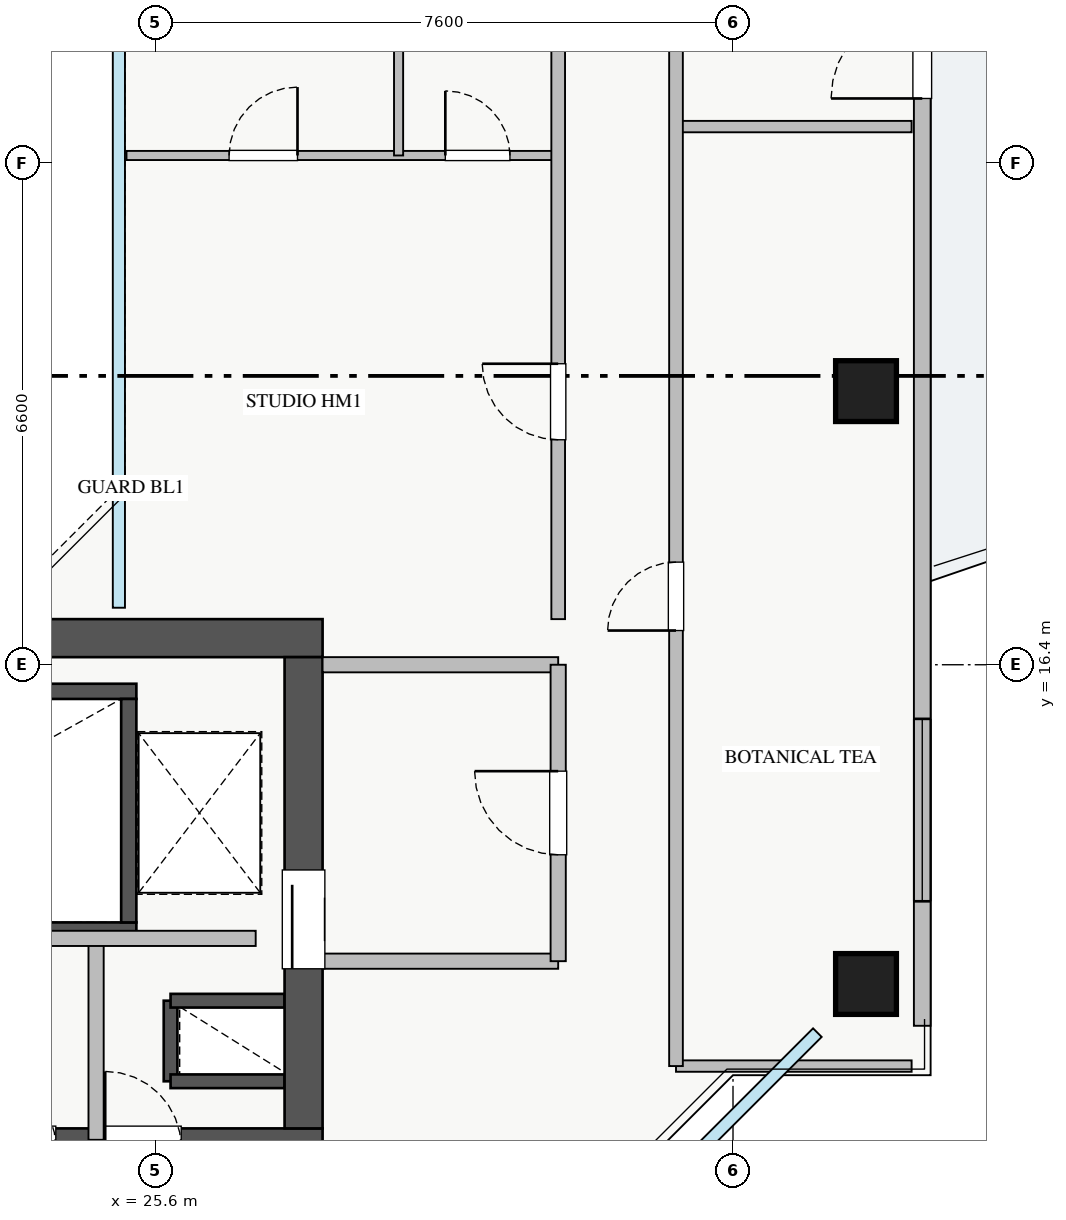
"""IFC4 building model, lengths in metres.
Left out: names, types, materials, properties, quantities, classifications, styles, units other than length and angle.
Written with IfcOpenShell. Run it as: python <this file> out.ifc"""

import sys

from ifc_helpers import new_model, si_unit, direction, frame, frame_2d, origin, origin_2d, place, context, subcontext, project, spatial, rectangle, extrude, source, transform, mapped, element, fill, save


model = new_model("IFC4")
c1 = context("Model", 3, precision=1e-05, world=origin(), true_north=direction((0.0, 1.0)))
c2 = subcontext(c1, "Body", "Model", "MODEL_VIEW")
j1 = project(units=[si_unit("LENGTHUNIT", "METRE"), si_unit("PLANEANGLEUNIT", "RADIAN")], contexts=[c1])
p1 = place(None, origin())
s1 = spatial("IfcSite", under=j1, at=p1, CompositionType="ELEMENT")
p2 = place(p1, origin())
s2 = spatial("IfcBuilding", under=s1, at=p2, CompositionType="ELEMENT")
p3 = place(p2, frame((0.0, 0.0, 190.5)))
s3 = spatial("IfcBuildingStorey", under=s2, at=p3, CompositionType="ELEMENT", Elevation=190.5)
p4 = place(p3, frame((25.8, 10.92, 0.0), z_axis=(0.0, 0.0, 1.0), x_axis=(0.0, 1.0, 0.0)))
e1 = element("IfcWall", 1, at=p4, inside=s3, PredefinedType="SHEAR", context=c2, shape_type="SweptSolid", body=[
    extrude(rectangle(XDim=1.06, YDim=0.18, at=frame_2d((0.53, 0.0))), origin(), (0.0, 0.0, 1.0), 3.07),
])
for number, where, z_axis, x_axis in (
    (2, (25.8, 11.98, 0.0), (0.0, 0.0, 1.0), (1.0, 0.0, 0.0)),
    (3, (25.8, 10.92, 0.0), (0.0, 0.0, 1.0), (1.0, 0.0, 0.0)),
):
    element("IfcWall", number, at=place(p3, frame(where, z_axis=z_axis, x_axis=x_axis)), inside=s3, PredefinedType="SHEAR", context=c2, shape_type="SweptSolid", body=[
        extrude(rectangle(XDim=1.5, YDim=0.18, at=frame_2d((0.75, 0.0))), origin(), (0.0, 0.0, 1.0), 3.07),
    ])
p5 = place(p3, frame((18.2, 12.91, 0.0), z_axis=(0.0, 0.0, 1.0), x_axis=(1.0, 0.0, 0.0)))
e4 = element("IfcWall", 4, at=p5, inside=s3, PredefinedType="SHEAR", context=c2, shape_type="SweptSolid", body=[
    extrude(rectangle(XDim=7.15, YDim=0.2, at=frame_2d((3.575, 0.0))), origin(), (0.0, 0.0, 1.0), 3.25),
])
p6 = place(p5, frame((0.35, 0.0, 0.0)))
e5 = element("IfcOpeningElement", 5, at=p6, cuts=e4, PredefinedType="OPENING", context=c2, shape_type="SweptSolid", body=[
    extrude(rectangle(XDim=1.1, YDim=2.05, at=frame_2d((0.55, 1.025))), frame((0.0, 0.11, 0.0), z_axis=(0.0, -1.0, 0.0), x_axis=(1.0, 0.0, 0.0)), (0.0, 0.0, 1.0), 0.22),
])
p7 = place(p3, frame((18.2, 16.05, 0.0), z_axis=(0.0, 0.0, 1.0), x_axis=(1.0, 0.0, 0.0)))
e6 = element("IfcWall", 6, at=p7, inside=s3, PredefinedType="SHEAR", context=c2, shape_type="SweptSolid", body=[
    extrude(rectangle(XDim=7.15, YDim=0.2, at=frame_2d((3.575, 0.0))), origin(), (0.0, 0.0, 1.0), 3.25),
])
p8 = place(p3, frame((25.25, 13.01, 0.0), z_axis=(0.0, 0.0, 1.0), x_axis=(0.0, 1.0, 0.0)))
e7 = element("IfcWall", 7, at=p8, inside=s3, PredefinedType="SHEAR", context=c2, shape_type="SweptSolid", body=[
    extrude(rectangle(XDim=2.94, YDim=0.2, at=frame_2d((1.47, 0.0))), origin(), (0.0, 0.0, 1.0), 3.25),
])
p9 = place(p3, frame((10.2, 10.05, 0.0), z_axis=(0.0, 0.0, 1.0), x_axis=(1.0, 0.0, 0.0)))
e8 = element("IfcWall", 8, at=p9, inside=s3, PredefinedType="SHEAR", context=c2, shape_type="SweptSolid", body=[
    extrude(rectangle(XDim=17.6, YDim=0.5, at=frame_2d((8.8, 0.0))), origin(), (0.0, 0.0, 1.0), 3.25),
])
p10 = place(p9, frame((1.15, 0.0, 0.0)))
e9 = element("IfcOpeningElement", 9, at=p10, cuts=e8, PredefinedType="OPENING", context=c2, shape_type="SweptSolid", body=[
    extrude(rectangle(XDim=1.1, YDim=2.05, at=frame_2d((0.55, 1.025))), frame((0.0, 0.26, 0.0), z_axis=(0.0, -1.0, 0.0), x_axis=(1.0, 0.0, 0.0)), (0.0, 0.0, 1.0), 0.52),
])
p11 = place(p9, frame((8.3, 0.0, 0.0)))
e10 = element("IfcOpeningElement", 10, at=p11, cuts=e8, PredefinedType="OPENING", context=c2, shape_type="SweptSolid", body=[
    extrude(rectangle(XDim=1.1, YDim=2.05, at=frame_2d((0.55, 1.025))), frame((0.0, 0.26, 0.0), z_axis=(0.0, -1.0, 0.0), x_axis=(1.0, 0.0, 0.0)), (0.0, 0.0, 1.0), 0.52),
])
p12 = place(p9, frame((2.85, 0.0, 0.0)))
e11 = element("IfcOpeningElement", 11, at=p12, cuts=e8, PredefinedType="OPENING", context=c2, shape_type="SweptSolid", body=[
    extrude(rectangle(XDim=1.1, YDim=2.05, at=frame_2d((0.55, 1.025))), frame((0.0, 0.26, 0.0), z_axis=(0.0, -1.0, 0.0), x_axis=(1.0, 0.0, 0.0)), (0.0, 0.0, 1.0), 0.52),
])
p13 = place(p9, frame((5.8, 0.0, 0.0)))
e12 = element("IfcOpeningElement", 12, at=p13, cuts=e8, PredefinedType="OPENING", context=c2, shape_type="SweptSolid", body=[
    extrude(rectangle(XDim=1.0, YDim=2.05, at=frame_2d((0.5, 1.025))), frame((0.0, 0.26, 0.0), z_axis=(0.0, -1.0, 0.0), x_axis=(1.0, 0.0, 0.0)), (0.0, 0.0, 1.0), 0.52),
])
p14 = place(p9, frame((14.74, 0.0, 0.0)))
e13 = element("IfcOpeningElement", 13, at=p14, cuts=e8, PredefinedType="OPENING", context=c2, shape_type="SweptSolid", body=[
    extrude(rectangle(XDim=1.0, YDim=2.05, at=frame_2d((0.5, 1.025))), frame((0.0, 0.26, 0.0), z_axis=(0.0, -1.0, 0.0), x_axis=(1.0, 0.0, 0.0)), (0.0, 0.0, 1.0), 0.52),
])
p15 = place(p9, frame((10.64, 0.0, 0.0)))
e14 = element("IfcOpeningElement", 14, at=p15, cuts=e8, PredefinedType="OPENING", context=c2, shape_type="SweptSolid", body=[
    extrude(rectangle(XDim=1.0, YDim=2.05, at=frame_2d((0.5, 1.025))), frame((0.0, 0.26, 0.0), z_axis=(0.0, -1.0, 0.0), x_axis=(1.0, 0.0, 0.0)), (0.0, 0.0, 1.0), 0.52),
])
p16 = place(p9, frame((13.09, 0.0, 0.0)))
e15 = element("IfcOpeningElement", 15, at=p16, cuts=e8, PredefinedType="OPENING", context=c2, shape_type="SweptSolid", body=[
    extrude(rectangle(XDim=1.0, YDim=2.05, at=frame_2d((0.5, 1.025))), frame((0.0, 0.26, 0.0), z_axis=(0.0, -1.0, 0.0), x_axis=(1.0, 0.0, 0.0)), (0.0, 0.0, 1.0), 0.52),
])
p17 = place(p3, frame((10.2, 16.75, 0.0), z_axis=(0.0, 0.0, 1.0), x_axis=(1.0, 0.0, 0.0)))
e16 = element("IfcWall", 16, at=p17, inside=s3, PredefinedType="SHEAR", context=c2, shape_type="SweptSolid", body=[
    extrude(rectangle(XDim=17.6, YDim=0.5, at=frame_2d((8.8, 0.0))), origin(), (0.0, 0.0, 1.0), 3.25),
])
p18 = place(p3, frame((27.55, 10.3, 0.0), z_axis=(0.0, 0.0, 1.0), x_axis=(0.0, 1.0, 0.0)))
e17 = element("IfcWall", 17, at=p18, inside=s3, PredefinedType="SHEAR", context=c2, shape_type="SweptSolid", body=[
    extrude(rectangle(XDim=6.2, YDim=0.5, at=frame_2d((3.1, 0.0))), origin(), (0.0, 0.0, 1.0), 3.25),
])
p19 = place(p18, frame((2.1, 0.0, 0.0)))
e18 = element("IfcOpeningElement", 18, at=p19, cuts=e17, PredefinedType="OPENING", context=c2, shape_type="SweptSolid", body=[
    extrude(rectangle(XDim=1.3, YDim=2.05, at=frame_2d((0.65, 1.025))), frame((0.0, 0.26, 0.0), z_axis=(0.0, -1.0, 0.0), x_axis=(1.0, 0.0, 0.0)), (0.0, 0.0, 1.0), 0.52),
])
m1 = source(origin(), c2, "Body", "SweptSolid", [
    extrude(rectangle(XDim=0.8, YDim=0.8, at=origin_2d()), origin(), (0.0, 0.0, 1.0), 3.25),
])
for number, where, z_axis, x_axis in (
    (19, (34.95, 12.2, 0.0), (0.0, 0.0, 1.0), (1.0, 0.0, 0.0)),
    (20, (34.95, 20.0, 0.0), (0.0, 0.0, 1.0), (1.0, 0.0, 0.0)),
):
    element("IfcColumn", number, at=place(p3, frame(where, z_axis=z_axis, x_axis=x_axis)), inside=s3, PredefinedType="COLUMN", context=c2, shape_type="MappedRepresentation", body=[
        mapped(m1, transform((0.0, 0.0, 0.0), x_axis=(1.0, 0.0, 0.0), y_axis=(0.0, 1.0, 0.0), z_axis=(0.0, 0.0, 1.0), scale=1.0)),
    ])
p20 = place(p3, frame((35.69, 11.65, 0.0), z_axis=(0.0, 0.0, 1.0), x_axis=(0.0, 1.0, 0.0)))
e21 = element("IfcWall", 21, at=p20, inside=s3, PredefinedType="STANDARD", context=c2, shape_type="SweptSolid", body=[
    extrude(rectangle(XDim=22.7, YDim=0.22, at=frame_2d((11.35, 0.0))), origin(), (0.0, 0.0, 1.0), 2.61),
])
p21 = place(p20, frame((12.2, 0.0, 0.0)))
e22 = element("IfcOpeningElement", 22, at=p21, cuts=e21, PredefinedType="OPENING", context=c2, shape_type="SweptSolid", body=[
    extrude(rectangle(XDim=1.2, YDim=2.1, at=frame_2d((0.6, 1.05))), frame((0.0, 0.12, 0.0), z_axis=(0.0, -1.0, 0.0), x_axis=(1.0, 0.0, 0.0)), (0.0, 0.0, 1.0), 0.24),
])
p22 = place(p20, frame((1.638, 0.0, 0.9)))
e23 = element("IfcOpeningElement", 23, at=p22, cuts=e21, PredefinedType="OPENING", context=c2, shape_type="SweptSolid", body=[
    extrude(rectangle(XDim=2.4, YDim=1.48, at=frame_2d((1.2, 0.74))), frame((0.0, 0.12, 0.0), z_axis=(0.0, -1.0, 0.0), x_axis=(1.0, 0.0, 0.0)), (0.0, 0.0, 1.0), 0.24),
])
p23 = place(p20, frame((18.813, 0.0, 0.9)))
e24 = element("IfcOpeningElement", 24, at=p23, cuts=e21, PredefinedType="OPENING", context=c2, shape_type="SweptSolid", body=[
    extrude(rectangle(XDim=2.1, YDim=1.48, at=frame_2d((1.05, 0.74))), frame((0.0, 0.12, 0.0), z_axis=(0.0, -1.0, 0.0), x_axis=(1.0, 0.0, 0.0)), (0.0, 0.0, 1.0), 0.24),
])
p24 = place(p3, frame((27.8, 16.4, 0.0), z_axis=(0.0, 0.0, 1.0), x_axis=(1.0, 0.0, 0.0)))
e25 = element("IfcWall", 25, at=p24, inside=s3, PredefinedType="PARTITIONING", context=c2, shape_type="SweptSolid", body=[
    extrude(rectangle(XDim=3.1, YDim=0.2, at=frame_2d((1.55, 0.0))), origin(), (0.0, 0.0, 1.0), 3.07),
])
p25 = place(p3, frame((27.8, 12.5, 0.0), z_axis=(0.0, 0.0, 1.0), x_axis=(1.0, 0.0, 0.0)))
e26 = element("IfcWall", 26, at=p25, inside=s3, PredefinedType="PARTITIONING", context=c2, shape_type="SweptSolid", body=[
    extrude(rectangle(XDim=3.1, YDim=0.2, at=frame_2d((1.55, 0.0))), origin(), (0.0, 0.0, 1.0), 2.265),
])
p26 = place(p3, frame((30.9, 12.5, 0.0), z_axis=(0.0, 0.0, 1.0), x_axis=(0.0, 1.0, 0.0)))
e27 = element("IfcWall", 27, at=p26, inside=s3, PredefinedType="PARTITIONING", context=c2, shape_type="SweptSolid", body=[
    extrude(rectangle(XDim=3.9, YDim=0.2, at=frame_2d((1.95, 0.0))), origin(), (0.0, 0.0, 1.0), 3.07),
])
p27 = place(p26, frame((1.4, 0.0, 0.0)))
e28 = element("IfcOpeningElement", 28, at=p27, cuts=e27, PredefinedType="OPENING", context=c2, shape_type="SweptSolid", body=[
    extrude(rectangle(XDim=1.1, YDim=2.05, at=frame_2d((0.55, 1.025))), frame((0.0, 0.11, 0.0), z_axis=(0.0, -1.0, 0.0), x_axis=(1.0, 0.0, 0.0)), (0.0, 0.0, 1.0), 0.22),
])
p28 = place(p3, frame((24.82, 10.15, 0.0), z_axis=(0.0, 0.0, 1.0), x_axis=(0.0, 1.0, 0.0)))
e29 = element("IfcWall", 29, at=p28, inside=s3, PredefinedType="PARTITIONING", context=c2, shape_type="SweptSolid", body=[
    extrude(rectangle(XDim=2.65, YDim=0.2, at=frame_2d((1.325, 0.0))), origin(), (0.0, 0.0, 1.0), 3.07),
])
p29 = place(p3, frame((21.75, 12.8, 0.0), z_axis=(0.0, 0.0, 1.0), x_axis=(1.0, 0.0, 0.0)))
e30 = element("IfcWall", 30, at=p29, inside=s3, PredefinedType="PARTITIONING", context=c2, shape_type="SweptSolid", body=[
    extrude(rectangle(XDim=5.17, YDim=0.2, at=frame_2d((2.585, 0.0))), origin(), (0.0, 0.0, 1.0), 3.07),
])
p30 = place(p3, frame((25.22, 23.1, 0.0), z_axis=(0.0, 0.0, 1.0), x_axis=(1.0, 0.0, 0.0)))
e31 = element("IfcWall", 31, at=p30, inside=s3, PredefinedType="PLUMBINGWALL", context=c2, shape_type="SweptSolid", body=[
    extrude(rectangle(XDim=5.68, YDim=0.12, at=frame_2d((2.84, 0.0))), origin(), (0.0, 0.0, 1.0), 3.07),
])
p31 = place(p30, frame((1.35, 0.0, 0.0)))
e32 = element("IfcOpeningElement", 32, at=p31, cuts=e31, PredefinedType="OPENING", context=c2, shape_type="SweptSolid", body=[
    extrude(rectangle(XDim=0.9, YDim=2.05, at=frame_2d((0.45, 1.025))), frame((0.0, 0.07, 0.0), z_axis=(0.0, -1.0, 0.0), x_axis=(1.0, 0.0, 0.0)), (0.0, 0.0, 1.0), 0.14),
])
p32 = place(p30, frame((4.195, 0.0, 0.0)))
e33 = element("IfcOpeningElement", 33, at=p32, cuts=e31, PredefinedType="OPENING", context=c2, shape_type="SweptSolid", body=[
    extrude(rectangle(XDim=0.85, YDim=2.05, at=frame_2d((0.425, 1.025))), frame((0.0, 0.07, 0.0), z_axis=(0.0, -1.0, 0.0), x_axis=(1.0, 0.0, 0.0)), (0.0, 0.0, 1.0), 0.14),
])
p33 = place(p3, frame((28.8, 23.1, 0.0), z_axis=(0.0, 0.0, 1.0), x_axis=(0.0, 1.0, 0.0)))
e34 = element("IfcWall", 34, at=p33, inside=s3, PredefinedType="PLUMBINGWALL", context=c2, shape_type="SweptSolid", body=[
    extrude(rectangle(XDim=5.9, YDim=0.12, at=frame_2d((2.95, 0.0))), origin(), (0.0, 0.0, 1.0), 3.07),
])
p34 = place(p3, frame((30.9, 17.0, 0.0), z_axis=(0.0, 0.0, 1.0), x_axis=(0.0, 1.0, 0.0)))
e35 = element("IfcWall", 35, at=p34, inside=s3, PredefinedType="PARTITIONING", context=c2, shape_type="SweptSolid", body=[
    extrude(rectangle(XDim=12.0, YDim=0.18, at=frame_2d((6.0, 0.0))), origin(), (0.0, 0.0, 1.0), 3.07),
])
p35 = place(p34, frame((2.36, 0.0, 0.0)))
e36 = element("IfcOpeningElement", 36, at=p35, cuts=e35, PredefinedType="OPENING", context=c2, shape_type="SweptSolid", body=[
    extrude(rectangle(XDim=1.0, YDim=2.05, at=frame_2d((0.5, 1.025))), frame((0.0, 0.1, 0.0), z_axis=(0.0, -1.0, 0.0), x_axis=(1.0, 0.0, 0.0)), (0.0, 0.0, 1.0), 0.2),
])
for number, where, z_axis, x_axis in (
    (37, (32.45, 11.12, 0.0), (0.0, 0.0, 1.0), (1.0, 0.0, 0.0)),
    (38, (32.45, 23.48, 0.0), (0.0, 0.0, 1.0), (1.0, 0.0, 0.0)),
):
    element("IfcWall", number, at=place(p3, frame(where, z_axis=z_axis, x_axis=x_axis)), inside=s3, PredefinedType="PARTITIONING", context=c2, shape_type="SweptSolid", body=[
        extrude(rectangle(XDim=3.1, YDim=0.15, at=frame_2d((1.55, 0.0))), origin(), (0.0, 0.0, 1.0), 3.07),
    ])
p36 = place(p3, frame((32.45, 11.12, 0.0), z_axis=(0.0, 0.0, 1.0), x_axis=(0.0, 1.0, 0.0)))
e39 = element("IfcWall", 39, at=p36, inside=s3, PredefinedType="PARTITIONING", context=c2, shape_type="SweptSolid", body=[
    extrude(rectangle(XDim=23.76, YDim=0.18, at=frame_2d((11.88, 0.0))), origin(), (0.0, 0.0, 1.0), 3.07),
])
p37 = place(p36, frame((5.73, 0.0, 0.0)))
e40 = element("IfcOpeningElement", 40, at=p37, cuts=e39, PredefinedType="OPENING", context=c2, shape_type="SweptSolid", body=[
    extrude(rectangle(XDim=0.9, YDim=2.05, at=frame_2d((0.45, 1.025))), frame((0.0, 0.1, 0.0), z_axis=(0.0, -1.0, 0.0), x_axis=(1.0, 0.0, 0.0)), (0.0, 0.0, 1.0), 0.2),
])
p38 = place(p36, frame((17.61, 0.0, 0.0)))
e41 = element("IfcOpeningElement", 41, at=p38, cuts=e39, PredefinedType="OPENING", context=c2, shape_type="SweptSolid", body=[
    extrude(rectangle(XDim=0.9, YDim=2.05, at=frame_2d((0.45, 1.025))), frame((0.0, 0.1, 0.0), z_axis=(0.0, -1.0, 0.0), x_axis=(1.0, 0.0, 0.0)), (0.0, 0.0, 1.0), 0.2),
])
m2 = source(origin(), c2, "Body", "SweptSolid", [
    extrude(rectangle(XDim=1.2, YDim=2.1, at=frame_2d((0.6, 1.05))), frame((0.0, 0.025, 0.0), z_axis=(0.0, -1.0, 0.0), x_axis=(1.0, 0.0, 0.0)), (0.0, 0.0, 1.0), 0.05),
])
p39 = place(p21, origin())
e42 = element("IfcDoor", 42, at=p39, inside=s3, OperationType="SINGLE_SWING_LEFT", PredefinedType="DOOR", context=c2, shape_type="MappedRepresentation", body=[
    mapped(m2, transform((0.0, 0.0, 0.0), x_axis=(1.0, 0.0, 0.0), y_axis=(0.0, 1.0, 0.0), z_axis=(0.0, 0.0, 1.0), scale=1.0)),
])
fill(e22, e42)
m3 = source(origin(), c2, "Body", "SweptSolid", [
    extrude(rectangle(XDim=2.4, YDim=1.48, at=frame_2d((1.2, 0.74))), frame((0.0, 0.03, 0.0), z_axis=(0.0, -1.0, 0.0), x_axis=(1.0, 0.0, 0.0)), (0.0, 0.0, 1.0), 0.06),
])
p40 = place(p22, origin())
e43 = element("IfcWindow", 43, at=p40, inside=s3, PartitioningType="TRIPLE_PANEL_VERTICAL", PredefinedType="WINDOW", context=c2, shape_type="MappedRepresentation", body=[
    mapped(m3, transform((0.0, 0.0, 0.0), x_axis=(1.0, 0.0, 0.0), y_axis=(0.0, 1.0, 0.0), z_axis=(0.0, 0.0, 1.0), scale=1.0)),
])
fill(e23, e43)
m4 = source(origin(), c2, "Body", "SweptSolid", [
    extrude(rectangle(XDim=1.3, YDim=2.05, at=frame_2d((0.65, 1.025))), frame((0.0, 0.025, 0.0), z_axis=(0.0, -1.0, 0.0), x_axis=(1.0, 0.0, 0.0)), (0.0, 0.0, 1.0), 0.05),
])
p41 = place(p19, origin())
e44 = element("IfcDoor", 44, at=p41, inside=s3, OperationType="SLIDING_TO_RIGHT", PredefinedType="DOOR", context=c2, shape_type="MappedRepresentation", body=[
    mapped(m4, transform((0.0, 0.0, 0.0), x_axis=(1.0, 0.0, 0.0), y_axis=(0.0, 1.0, 0.0), z_axis=(0.0, 0.0, 1.0), scale=1.0)),
])
fill(e18, e44)
m5 = source(origin(), c2, "Body", "SweptSolid", [
    extrude(rectangle(XDim=1.1, YDim=2.05, at=frame_2d((0.55, 1.025))), frame((0.0, 0.025, 0.0), z_axis=(0.0, -1.0, 0.0), x_axis=(1.0, 0.0, 0.0)), (0.0, 0.0, 1.0), 0.05),
])
p42 = place(p27, origin())
e45 = element("IfcDoor", 45, at=p42, inside=s3, OperationType="SINGLE_SWING_RIGHT", PredefinedType="DOOR", context=c2, shape_type="MappedRepresentation", body=[
    mapped(m5, transform((0.0, 0.0, 0.0), x_axis=(1.0, 0.0, 0.0), y_axis=(0.0, 1.0, 0.0), z_axis=(0.0, 0.0, 1.0), scale=1.0)),
])
fill(e28, e45)
m6 = source(origin(), c2, "Body", "SweptSolid", [
    extrude(rectangle(XDim=0.9, YDim=2.05, at=frame_2d((0.45, 1.025))), frame((0.0, 0.025, 0.0), z_axis=(0.0, -1.0, 0.0), x_axis=(1.0, 0.0, 0.0)), (0.0, 0.0, 1.0), 0.05),
])
p43 = place(p31, origin())
e46 = element("IfcDoor", 46, at=p43, inside=s3, OperationType="SINGLE_SWING_RIGHT", PredefinedType="DOOR", context=c2, shape_type="MappedRepresentation", body=[
    mapped(m6, transform((0.0, 0.0, 0.0), x_axis=(1.0, 0.0, 0.0), y_axis=(0.0, 1.0, 0.0), z_axis=(0.0, 0.0, 1.0), scale=1.0)),
])
fill(e32, e46)
m7 = source(origin(), c2, "Body", "SweptSolid", [
    extrude(rectangle(XDim=0.85, YDim=2.05, at=frame_2d((0.425, 1.025))), frame((0.0, 0.025, 0.0), z_axis=(0.0, -1.0, 0.0), x_axis=(1.0, 0.0, 0.0)), (0.0, 0.0, 1.0), 0.05),
])
p44 = place(p32, origin())
e47 = element("IfcDoor", 47, at=p44, inside=s3, OperationType="SINGLE_SWING_LEFT", PredefinedType="DOOR", context=c2, shape_type="MappedRepresentation", body=[
    mapped(m7, transform((0.0, 0.0, 0.0), x_axis=(1.0, 0.0, 0.0), y_axis=(0.0, 1.0, 0.0), z_axis=(0.0, 0.0, 1.0), scale=1.0)),
])
fill(e33, e47)
m8 = source(origin(), c2, "Body", "SweptSolid", [
    extrude(rectangle(XDim=1.0, YDim=2.05, at=frame_2d((0.5, 1.025))), frame((0.0, 0.025, 0.0), z_axis=(0.0, -1.0, 0.0), x_axis=(1.0, 0.0, 0.0)), (0.0, 0.0, 1.0), 0.05),
])
p45 = place(p35, origin())
e48 = element("IfcDoor", 48, at=p45, inside=s3, OperationType="SINGLE_SWING_RIGHT", PredefinedType="DOOR", context=c2, shape_type="MappedRepresentation", body=[
    mapped(m8, transform((0.0, 0.0, 0.0), x_axis=(1.0, 0.0, 0.0), y_axis=(0.0, 1.0, 0.0), z_axis=(0.0, 0.0, 1.0), scale=1.0)),
])
fill(e36, e48)
p46 = place(p37, origin())
e49 = element("IfcDoor", 49, at=p46, inside=s3, OperationType="SINGLE_SWING_LEFT", PredefinedType="DOOR", context=c2, shape_type="MappedRepresentation", body=[
    mapped(m6, transform((0.0, 0.0, 0.0), x_axis=(1.0, 0.0, 0.0), y_axis=(0.0, 1.0, 0.0), z_axis=(0.0, 0.0, 1.0), scale=1.0)),
])
fill(e40, e49)
save(model, sys.argv[1])
